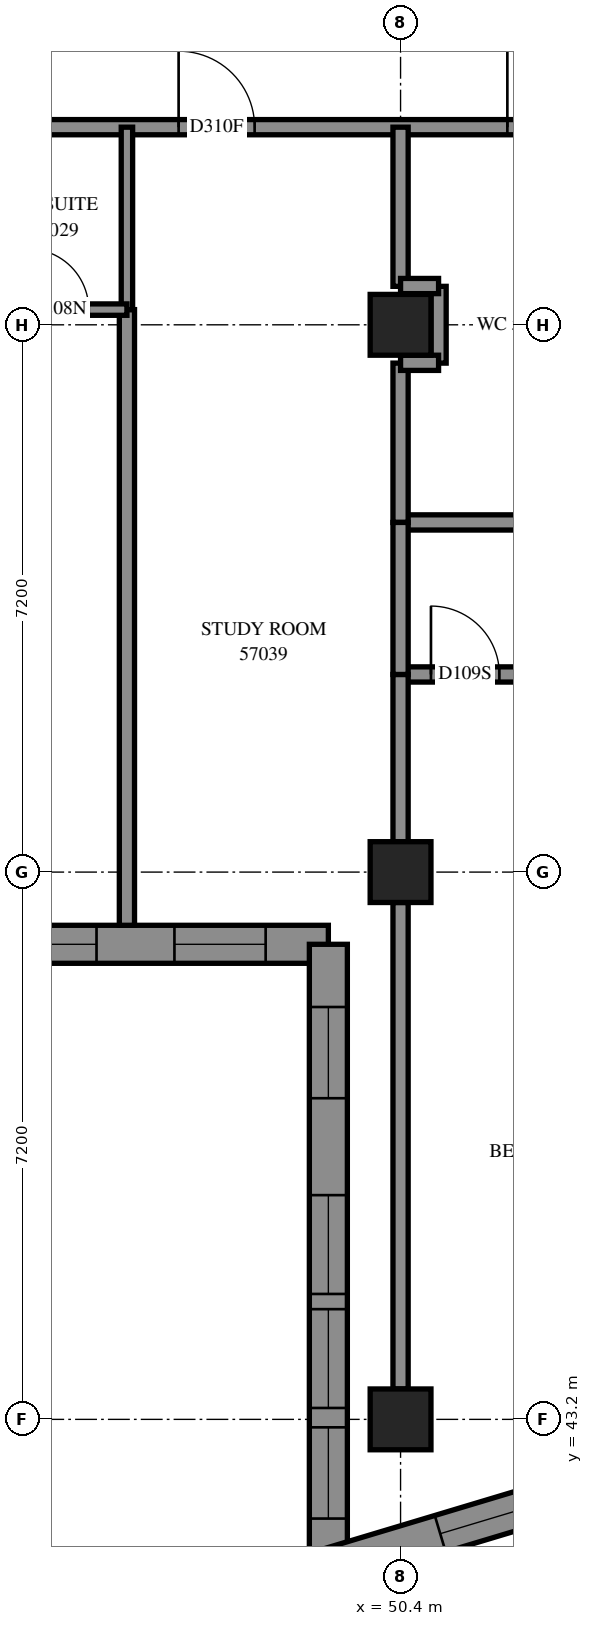
"""IFC4 building model, lengths in metres.
Left out: names, types, materials, properties, quantities, classifications, styles, units other than length and angle.
Written with IfcOpenShell. Run it as: python <this file> out.ifc"""

import sys

from ifc_helpers import new_model, si_unit, direction, frame, frame_2d, origin, origin_2d, place, context, subcontext, project, spatial, polyline, rectangle, outline, extrude, element, fill, save


model = new_model("IFC4")
c1 = context("Model", 3, precision=1e-05, world=origin(), true_north=direction((0.0, 1.0)))
c2 = subcontext(c1, "Body", "Model", "MODEL_VIEW")
j1 = project(units=[si_unit("LENGTHUNIT", "METRE"), si_unit("PLANEANGLEUNIT", "RADIAN")], contexts=[c1])
p1 = place(None, origin())
s1 = spatial("IfcSite", under=j1, at=p1, CompositionType="ELEMENT")
p2 = place(p1, origin())
s2 = spatial("IfcBuilding", under=s1, at=p2, CompositionType="ELEMENT")
p3 = place(p2, frame((0.0, 0.0, 210.0)))
s3 = spatial("IfcBuildingStorey", under=s2, at=p3, CompositionType="ELEMENT", Elevation=210.0)
for number, where, z_axis, x_axis in (
    (1, (50.4, 43.2, 0.0), (0.0, 0.0, 1.0), (1.0, 0.0, 0.0)),
    (2, (50.4, 50.4, 0.0), (0.0, 0.0, 1.0), (1.0, 0.0, 0.0)),
    (3, (50.4, 57.6, 0.0), (0.0, 0.0, 1.0), (1.0, 0.0, 0.0)),
):
    element("IfcColumn", number, at=place(p3, frame(where, z_axis=z_axis, x_axis=x_axis)), inside=s3, PredefinedType="COLUMN", context=c2, shape_type="SweptSolid", body=[
        extrude(rectangle(XDim=0.8, YDim=0.8, at=origin_2d()), origin(), (0.0, 0.0, 1.0), 3.1),
    ])
p4 = place(p3, frame((42.25, 49.45, 0.0), z_axis=(0.0, 0.0, 1.0), x_axis=(1.0, 0.0, 0.0)))
e4 = element("IfcWall", 4, at=p4, inside=s3, PredefinedType="SOLIDWALL", context=c2, shape_type="SweptSolid", body=[
    extrude(outline(polyline([(-0.25, -0.25), (6.95, -0.25), (7.45, 0.25), (0.25, 0.25), (-0.25, -0.25)])), origin(), (0.0, 0.0, 1.0), 3.1),
])
p5 = place(p4, frame((1.35, 0.0, 0.45)))
e5 = element("IfcOpeningElement", 5, at=p5, cuts=e4, PredefinedType="OPENING", context=c2, shape_type="SweptSolid", body=[
    extrude(rectangle(XDim=1.3, YDim=2.5, at=frame_2d((0.65, 1.25))), frame((0.0, 0.26, 0.0), z_axis=(0.0, -1.0, 0.0), x_axis=(1.0, 0.0, 0.0)), (0.0, 0.0, 1.0), 0.52),
])
p6 = place(p4, frame((2.85, 0.0, 0.45)))
e6 = element("IfcOpeningElement", 6, at=p6, cuts=e4, PredefinedType="OPENING", context=c2, shape_type="SweptSolid", body=[
    extrude(rectangle(XDim=1.3, YDim=2.5, at=frame_2d((0.65, 1.25))), frame((0.0, 0.26, 0.0), z_axis=(0.0, -1.0, 0.0), x_axis=(1.0, 0.0, 0.0)), (0.0, 0.0, 1.0), 0.52),
])
p7 = place(p4, frame((5.175, 0.0, 0.45)))
e7 = element("IfcOpeningElement", 7, at=p7, cuts=e4, PredefinedType="OPENING", context=c2, shape_type="SweptSolid", body=[
    extrude(rectangle(XDim=1.2, YDim=2.5, at=frame_2d((0.6, 1.25))), frame((0.0, 0.26, 0.0), z_axis=(0.0, -1.0, 0.0), x_axis=(1.0, 0.0, 0.0)), (0.0, 0.0, 1.0), 0.52),
])
p8 = place(p3, frame((49.45, 49.45, 0.0), z_axis=(0.0, 0.0, 1.0), x_axis=(0.0, -1.0, 0.0)))
e8 = element("IfcWall", 8, at=p8, inside=s3, PredefinedType="SOLIDWALL", context=c2, shape_type="SweptSolid", body=[
    extrude(outline(polyline([(0.25, -0.25), (8.532, -0.25), (7.86, 0.25), (-0.25, 0.25), (0.25, -0.25)])), origin(), (0.0, 0.0, 1.0), 3.1),
])
p9 = place(p8, frame((3.3, 0.0, 0.45)))
e9 = element("IfcOpeningElement", 9, at=p9, cuts=e8, PredefinedType="OPENING", context=c2, shape_type="SweptSolid", body=[
    extrude(rectangle(XDim=1.3, YDim=2.5, at=frame_2d((0.65, 1.25))), frame((0.0, 0.26, 0.0), z_axis=(0.0, -1.0, 0.0), x_axis=(1.0, 0.0, 0.0)), (0.0, 0.0, 1.0), 0.52),
])
p10 = place(p8, frame((4.8, 0.0, 0.45)))
e10 = element("IfcOpeningElement", 10, at=p10, cuts=e8, PredefinedType="OPENING", context=c2, shape_type="SweptSolid", body=[
    extrude(rectangle(XDim=1.3, YDim=2.5, at=frame_2d((0.65, 1.25))), frame((0.0, 0.26, 0.0), z_axis=(0.0, -1.0, 0.0), x_axis=(1.0, 0.0, 0.0)), (0.0, 0.0, 1.0), 0.52),
])
p11 = place(p8, frame((0.825, 0.0, 0.45)))
e11 = element("IfcOpeningElement", 11, at=p11, cuts=e8, PredefinedType="OPENING", context=c2, shape_type="SweptSolid", body=[
    extrude(rectangle(XDim=1.2, YDim=2.5, at=frame_2d((0.6, 1.25))), frame((0.0, 0.26, 0.0), z_axis=(0.0, -1.0, 0.0), x_axis=(1.0, 0.0, 0.0)), (0.0, 0.0, 1.0), 0.52),
])
p12 = place(p8, frame((6.355, 0.0, 0.45)))
e12 = element("IfcOpeningElement", 12, at=p12, cuts=e8, PredefinedType="OPENING", context=c2, shape_type="SweptSolid", body=[
    extrude(rectangle(XDim=1.2, YDim=2.5, at=frame_2d((0.6, 1.25))), frame((0.0, 0.26, 0.0), z_axis=(0.0, -1.0, 0.0), x_axis=(1.0, 0.0, 0.0)), (0.0, 0.0, 1.0), 0.52),
])
p13 = place(p3, frame((49.45, 41.254, 0.0), z_axis=(0.0, 0.0, 1.0), x_axis=(0.9577907027, 0.2874664673, 0.0)))
e13 = element("IfcWall", 13, at=p13, inside=s3, PredefinedType="SOLIDWALL", context=c2, shape_type="SweptSolid", body=[
    extrude(outline(polyline([(-0.336, -0.25), (3.428, -0.25), (3.535, 0.25), (0.336, 0.25), (-0.336, -0.25)])), origin(), (0.0, 0.0, 1.0), 3.1),
])
p14 = place(p13, frame((1.537, 0.0, 0.45)))
e14 = element("IfcOpeningElement", 14, at=p14, cuts=e13, PredefinedType="OPENING", context=c2, shape_type="SweptSolid", body=[
    extrude(rectangle(XDim=1.2, YDim=2.5, at=frame_2d((0.6, 1.25))), frame((0.0, 0.26, 0.0), z_axis=(0.0, -1.0, 0.0), x_axis=(1.0, 0.0, 0.0)), (0.0, 0.0, 1.0), 0.52),
])
p15 = place(p3, frame((36.0, 60.2, 0.0), z_axis=(0.0, 0.0, 1.0), x_axis=(1.0, 0.0, 0.0)))
e15 = element("IfcWall", 15, at=p15, inside=s3, PredefinedType="PARTITIONING", context=c2, shape_type="SweptSolid", body=[
    extrude(rectangle(XDim=17.0, YDim=0.2, at=frame_2d((8.5, 0.0))), origin(), (0.0, 0.0, 1.0), 3.1),
])
p16 = place(p15, frame((4.125, 0.0, 0.0)))
e16 = element("IfcOpeningElement", 16, at=p16, cuts=e15, PredefinedType="OPENING", context=c2, shape_type="SweptSolid", body=[
    extrude(rectangle(XDim=1.0, YDim=2.1, at=frame_2d((0.5, 1.05))), frame((0.0, 0.11, 0.0), z_axis=(0.0, -1.0, 0.0), x_axis=(1.0, 0.0, 0.0)), (0.0, 0.0, 1.0), 0.22),
])
p17 = place(p15, frame((7.6, 0.0, 0.0)))
e17 = element("IfcOpeningElement", 17, at=p17, cuts=e15, PredefinedType="OPENING", context=c2, shape_type="SweptSolid", body=[
    extrude(rectangle(XDim=0.9, YDim=2.1, at=frame_2d((0.45, 1.05))), frame((0.0, 0.11, 0.0), z_axis=(0.0, -1.0, 0.0), x_axis=(1.0, 0.0, 0.0)), (0.0, 0.0, 1.0), 0.22),
])
p18 = place(p15, frame((11.48, 0.0, 0.0)))
e18 = element("IfcOpeningElement", 18, at=p18, cuts=e15, PredefinedType="OPENING", context=c2, shape_type="SweptSolid", body=[
    extrude(rectangle(XDim=1.0, YDim=2.1, at=frame_2d((0.5, 1.05))), frame((0.0, 0.11, 0.0), z_axis=(0.0, -1.0, 0.0), x_axis=(1.0, 0.0, 0.0)), (0.0, 0.0, 1.0), 0.22),
])
p19 = place(p15, frame((15.805, 0.0, 0.0)))
e19 = element("IfcOpeningElement", 19, at=p19, cuts=e15, PredefinedType="OPENING", context=c2, shape_type="SweptSolid", body=[
    extrude(rectangle(XDim=1.0, YDim=2.1, at=frame_2d((0.5, 1.05))), frame((0.0, 0.11, 0.0), z_axis=(0.0, -1.0, 0.0), x_axis=(1.0, 0.0, 0.0)), (0.0, 0.0, 1.0), 0.22),
])
p20 = place(p3, frame((46.8, 49.7, 0.0), z_axis=(0.0, 0.0, 1.0), x_axis=(0.0, 1.0, 0.0)))
e20 = element("IfcWall", 20, at=p20, inside=s3, PredefinedType="PARTITIONING", context=c2, shape_type="SweptSolid", body=[
    extrude(rectangle(XDim=8.1, YDim=0.2, at=frame_2d((4.05, 0.0))), origin(), (0.0, 0.0, 1.0), 3.1),
])
p21 = place(p3, frame((50.4, 43.6, 0.0), z_axis=(0.0, 0.0, 1.0), x_axis=(0.0, 1.0, 0.0)))
e21 = element("IfcWall", 21, at=p21, inside=s3, PredefinedType="PARTITIONING", context=c2, shape_type="SweptSolid", body=[
    extrude(rectangle(XDim=6.4, YDim=0.2, at=frame_2d((3.2, 0.0))), origin(), (0.0, 0.0, 1.0), 2.6),
])
p22 = place(p3, frame((50.4, 53.0, 0.0), z_axis=(0.0, 0.0, 1.0), x_axis=(1.0, 0.0, 0.0)))
e22 = element("IfcWall", 22, at=p22, inside=s3, PredefinedType="PARTITIONING", context=c2, shape_type="SweptSolid", body=[
    extrude(rectangle(XDim=5.2, YDim=0.2, at=frame_2d((2.6, 0.0))), origin(), (0.0, 0.0, 1.0), 3.1),
])
p23 = place(p22, frame((0.4, 0.0, 0.0)))
e23 = element("IfcOpeningElement", 23, at=p23, cuts=e22, PredefinedType="OPENING", context=c2, shape_type="SweptSolid", body=[
    extrude(rectangle(XDim=0.9, YDim=2.1, at=frame_2d((0.45, 1.05))), frame((0.0, 0.11, 0.0), z_axis=(0.0, -1.0, 0.0), x_axis=(1.0, 0.0, 0.0)), (0.0, 0.0, 1.0), 0.22),
])
p24 = place(p22, frame((3.946, 0.0, 0.0)))
e24 = element("IfcOpeningElement", 24, at=p24, cuts=e22, PredefinedType="OPENING", context=c2, shape_type="SweptSolid", body=[
    extrude(rectangle(XDim=1.0, YDim=2.1, at=frame_2d((0.5, 1.05))), frame((0.0, 0.11, 0.0), z_axis=(0.0, -1.0, 0.0), x_axis=(1.0, 0.0, 0.0)), (0.0, 0.0, 1.0), 0.22),
])
p25 = place(p3, frame((50.4, 55.0, 0.0), z_axis=(0.0, 0.0, 1.0), x_axis=(1.0, 0.0, 0.0)))
e25 = element("IfcWall", 25, at=p25, inside=s3, PredefinedType="PARTITIONING", context=c2, shape_type="SweptSolid", body=[
    extrude(rectangle(XDim=2.6, YDim=0.2, at=frame_2d((1.3, 0.0))), origin(), (0.0, 0.0, 1.0), 3.1),
])
p26 = place(p3, frame((46.8, 57.8, 0.0), z_axis=(0.0, 0.0, 1.0), x_axis=(0.0, 1.0, 0.0)))
e26 = element("IfcWall", 26, at=p26, inside=s3, PredefinedType="PARTITIONING", context=c2, shape_type="SweptSolid", body=[
    extrude(rectangle(XDim=2.4, YDim=0.15, at=frame_2d((1.2, 0.0))), origin(), (0.0, 0.0, 1.0), 3.1),
])
p27 = place(p3, frame((50.4, 50.8, 0.0), z_axis=(0.0, 0.0, 1.0), x_axis=(0.0, 1.0, 0.0)))
e27 = element("IfcWall", 27, at=p27, inside=s3, PredefinedType="PARTITIONING", context=c2, shape_type="SweptSolid", body=[
    extrude(rectangle(XDim=2.2, YDim=0.2, at=frame_2d((1.1, 0.0))), origin(), (0.0, 0.0, 1.0), 3.1),
])
p28 = place(p3, frame((50.4, 55.0, 0.0), z_axis=(0.0, 0.0, 1.0), x_axis=(0.0, 1.0, 0.0)))
e28 = element("IfcWall", 28, at=p28, inside=s3, PredefinedType="PARTITIONING", context=c2, shape_type="SweptSolid", body=[
    extrude(rectangle(XDim=2.096, YDim=0.2, at=frame_2d((1.048, 0.0))), origin(), (0.0, 0.0, 1.0), 3.1),
])
p29 = place(p3, frame((50.4, 58.106, 0.0), z_axis=(0.0, 0.0, 1.0), x_axis=(0.0, 1.0, 0.0)))
e29 = element("IfcWall", 29, at=p29, inside=s3, PredefinedType="PARTITIONING", context=c2, shape_type="SweptSolid", body=[
    extrude(rectangle(XDim=2.094, YDim=0.2, at=frame_2d((1.047, 0.0))), origin(), (0.0, 0.0, 1.0), 3.1),
])
p30 = place(p3, frame((50.4, 53.0, 0.0), z_axis=(0.0, 0.0, 1.0), x_axis=(0.0, 1.0, 0.0)))
e30 = element("IfcWall", 30, at=p30, inside=s3, PredefinedType="PARTITIONING", context=c2, shape_type="SweptSolid", body=[
    extrude(rectangle(XDim=2.0, YDim=0.2, at=frame_2d((1.0, 0.0))), origin(), (0.0, 0.0, 1.0), 3.1),
])
p31 = place(p3, frame((44.9, 57.8, 0.0), z_axis=(0.0, 0.0, 1.0), x_axis=(1.0, 0.0, 0.0)))
e31 = element("IfcWall", 31, at=p31, inside=s3, PredefinedType="PARTITIONING", context=c2, shape_type="SweptSolid", body=[
    extrude(rectangle(XDim=1.9, YDim=0.15, at=frame_2d((0.95, 0.0))), origin(), (0.0, 0.0, 1.0), 3.1),
])
p32 = place(p31, frame((0.598, 0.0, 0.0)))
e32 = element("IfcOpeningElement", 32, at=p32, cuts=e31, PredefinedType="OPENING", context=c2, shape_type="SweptSolid", body=[
    extrude(rectangle(XDim=0.8, YDim=2.1, at=frame_2d((0.4, 1.05))), frame((0.0, 0.085, 0.0), z_axis=(0.0, -1.0, 0.0), x_axis=(1.0, 0.0, 0.0)), (0.0, 0.0, 1.0), 0.17),
])
p33 = place(p3, frame((50.9, 57.096, 0.0), z_axis=(0.0, 0.0, 1.0), x_axis=(0.0, 1.0, 0.0)))
e33 = element("IfcWall", 33, at=p33, inside=s3, PredefinedType="PARTITIONING", context=c2, shape_type="SweptSolid", body=[
    extrude(rectangle(XDim=1.01, YDim=0.2, at=frame_2d((0.505, 0.0))), origin(), (0.0, 0.0, 1.0), 3.1),
])
for number, where, z_axis, x_axis in (
    (34, (50.4, 58.11, 0.0), (0.0, 0.0, 1.0), (1.0, 0.0, 0.0)),
    (35, (50.4, 57.1, 0.0), (0.0, 0.0, 1.0), (1.0, 0.0, 0.0)),
):
    element("IfcWall", number, at=place(p3, frame(where, z_axis=z_axis, x_axis=x_axis)), inside=s3, PredefinedType="PARTITIONING", context=c2, shape_type="SweptSolid", body=[
        extrude(rectangle(XDim=0.5, YDim=0.2, at=frame_2d((0.25, 0.0))), origin(), (0.0, 0.0, 1.0), 3.1),
    ])
p34 = place(p6, origin())
e36 = element("IfcWindow", 36, at=p34, inside=s3, PartitioningType="SINGLE_PANEL", PredefinedType="WINDOW", context=c2, shape_type="SweptSolid", body=[
    extrude(rectangle(XDim=1.3, YDim=2.5, at=frame_2d((0.65, 1.25))), frame((0.0, 0.18, 0.0), z_axis=(0.0, -1.0, 0.0), x_axis=(1.0, 0.0, 0.0)), (0.0, 0.0, 1.0), 0.06),
])
fill(e6, e36)
p35 = place(p7, origin())
e37 = element("IfcWindow", 37, at=p35, inside=s3, PartitioningType="SINGLE_PANEL", PredefinedType="WINDOW", context=c2, shape_type="SweptSolid", body=[
    extrude(rectangle(XDim=1.2, YDim=2.5, at=frame_2d((0.6, 1.25))), frame((0.0, 0.18, 0.0), z_axis=(0.0, -1.0, 0.0), x_axis=(1.0, 0.0, 0.0)), (0.0, 0.0, 1.0), 0.06),
])
fill(e7, e37)
p36 = place(p9, origin())
e38 = element("IfcWindow", 38, at=p36, inside=s3, PartitioningType="SINGLE_PANEL", PredefinedType="WINDOW", context=c2, shape_type="SweptSolid", body=[
    extrude(rectangle(XDim=1.3, YDim=2.5, at=frame_2d((0.65, 1.25))), frame((0.0, 0.18, 0.0), z_axis=(0.0, -1.0, 0.0), x_axis=(1.0, 0.0, 0.0)), (0.0, 0.0, 1.0), 0.06),
])
fill(e9, e38)
p37 = place(p10, origin())
e39 = element("IfcWindow", 39, at=p37, inside=s3, PartitioningType="SINGLE_PANEL", PredefinedType="WINDOW", context=c2, shape_type="SweptSolid", body=[
    extrude(rectangle(XDim=1.3, YDim=2.5, at=frame_2d((0.65, 1.25))), frame((0.0, 0.18, 0.0), z_axis=(0.0, -1.0, 0.0), x_axis=(1.0, 0.0, 0.0)), (0.0, 0.0, 1.0), 0.06),
])
fill(e10, e39)
p38 = place(p11, origin())
e40 = element("IfcWindow", 40, at=p38, inside=s3, PartitioningType="SINGLE_PANEL", PredefinedType="WINDOW", context=c2, shape_type="SweptSolid", body=[
    extrude(rectangle(XDim=1.2, YDim=2.5, at=frame_2d((0.6, 1.25))), frame((0.0, 0.18, 0.0), z_axis=(0.0, -1.0, 0.0), x_axis=(1.0, 0.0, 0.0)), (0.0, 0.0, 1.0), 0.06),
])
fill(e11, e40)
p39 = place(p12, origin())
e41 = element("IfcWindow", 41, at=p39, inside=s3, PartitioningType="SINGLE_PANEL", PredefinedType="WINDOW", context=c2, shape_type="SweptSolid", body=[
    extrude(rectangle(XDim=1.2, YDim=2.5, at=frame_2d((0.6, 1.25))), frame((0.0, 0.18, 0.0), z_axis=(0.0, -1.0, 0.0), x_axis=(1.0, 0.0, 0.0)), (0.0, 0.0, 1.0), 0.06),
])
fill(e12, e41)
p40 = place(p14, origin())
e42 = element("IfcWindow", 42, at=p40, inside=s3, PartitioningType="SINGLE_PANEL", PredefinedType="WINDOW", context=c2, shape_type="SweptSolid", body=[
    extrude(rectangle(XDim=1.2, YDim=2.5, at=frame_2d((0.6, 1.25))), frame((0.0, 0.18, 0.0), z_axis=(0.0, -1.0, 0.0), x_axis=(1.0, 0.0, 0.0)), (0.0, 0.0, 1.0), 0.06),
])
fill(e14, e42)
p41 = place(p32, origin())
e43 = element("IfcDoor", 43, at=p41, inside=s3, OperationType="SINGLE_SWING_RIGHT", PredefinedType="DOOR", context=c2, shape_type="SweptSolid", body=[
    extrude(rectangle(XDim=0.8, YDim=2.1, at=frame_2d((0.4, 1.05))), frame((0.0, 0.025, 0.0), z_axis=(0.0, -1.0, 0.0), x_axis=(1.0, 0.0, 0.0)), (0.0, 0.0, 1.0), 0.05),
])
fill(e32, e43)
p42 = place(p18, origin())
e44 = element("IfcDoor", 44, at=p42, inside=s3, OperationType="SINGLE_SWING_RIGHT", PredefinedType="DOOR", context=c2, shape_type="SweptSolid", body=[
    extrude(rectangle(XDim=1.0, YDim=2.1, at=frame_2d((0.5, 1.05))), frame((0.0, 0.025, 0.0), z_axis=(0.0, -1.0, 0.0), x_axis=(1.0, 0.0, 0.0)), (0.0, 0.0, 1.0), 0.05),
])
fill(e18, e44)
p43 = place(p19, origin())
e45 = element("IfcDoor", 45, at=p43, inside=s3, OperationType="SINGLE_SWING_LEFT", PredefinedType="DOOR", context=c2, shape_type="SweptSolid", body=[
    extrude(rectangle(XDim=1.0, YDim=2.1, at=frame_2d((0.5, 1.05))), frame((0.0, 0.025, 0.0), z_axis=(0.0, -1.0, 0.0), x_axis=(1.0, 0.0, 0.0)), (0.0, 0.0, 1.0), 0.05),
])
fill(e19, e45)
p44 = place(p23, origin())
e46 = element("IfcDoor", 46, at=p44, inside=s3, OperationType="SINGLE_SWING_LEFT", PredefinedType="DOOR", context=c2, shape_type="SweptSolid", body=[
    extrude(rectangle(XDim=0.9, YDim=2.1, at=frame_2d((0.45, 1.05))), frame((0.0, 0.025, 0.0), z_axis=(0.0, -1.0, 0.0), x_axis=(1.0, 0.0, 0.0)), (0.0, 0.0, 1.0), 0.05),
])
fill(e23, e46)
save(model, sys.argv[1])
